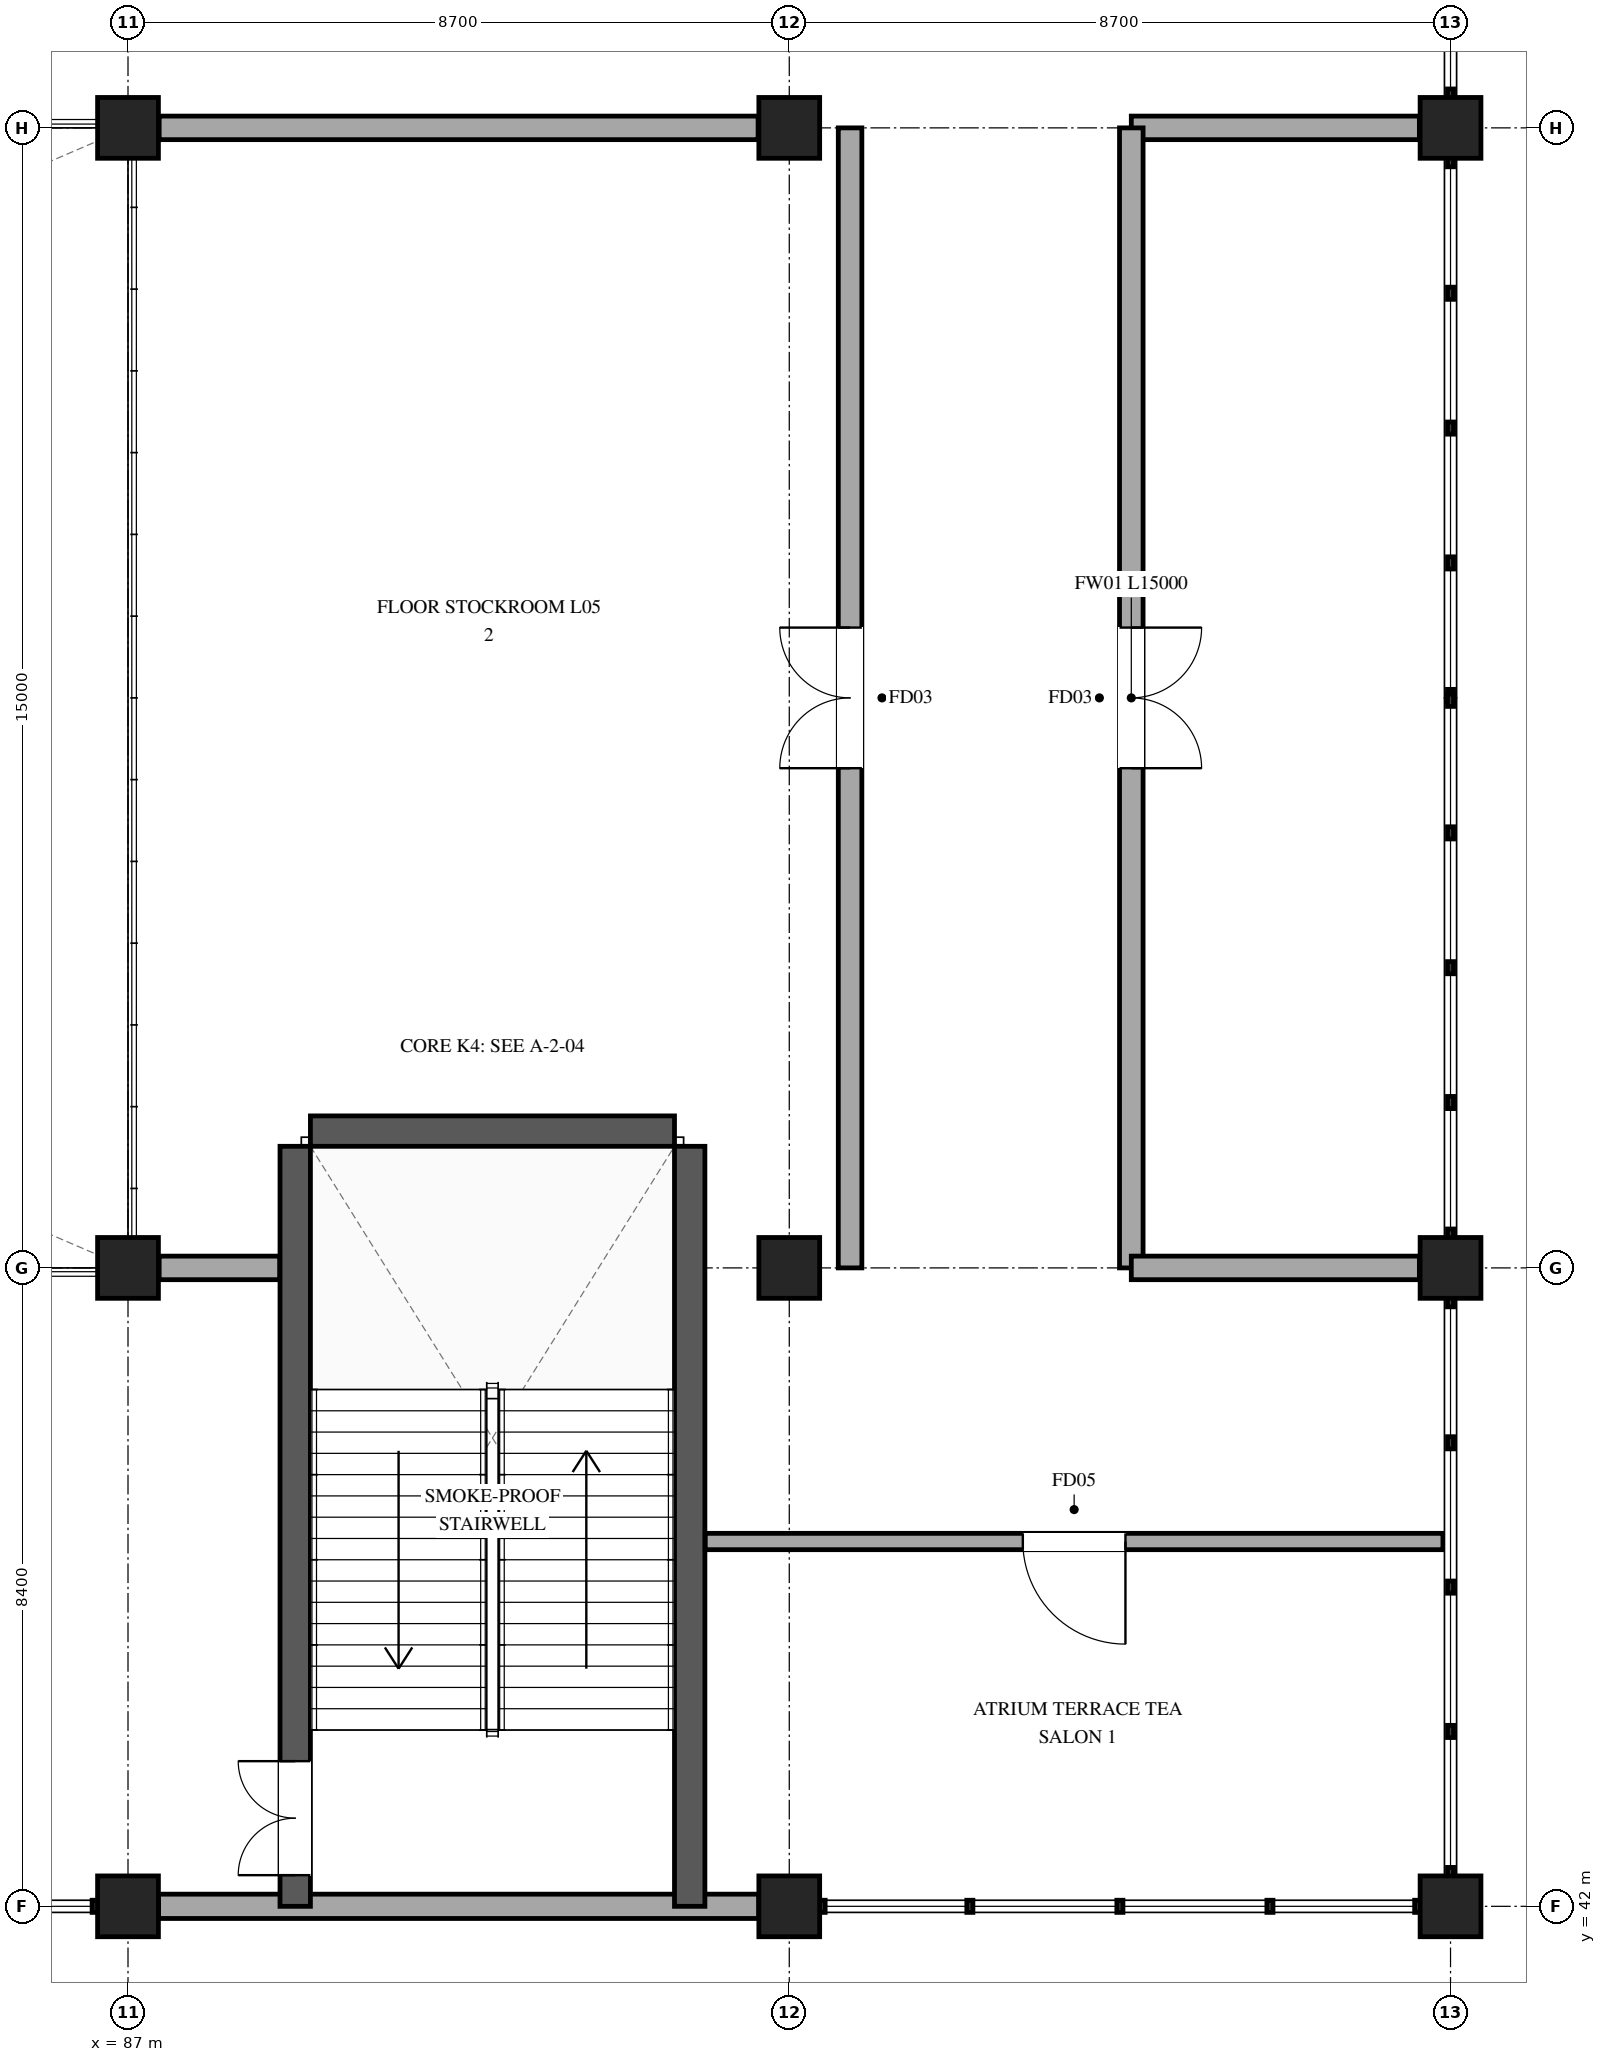
"""IFC4 building model, lengths in metres.
Left out: names, types, materials, properties, quantities, classifications, styles, units other than length and angle.
Written with IfcOpenShell. Run it as: python <this file> out.ifc"""

import sys

from ifc_helpers import new_model, si_unit, direction, frame, frame_2d, origin, origin_2d, place, context, subcontext, project, spatial, rectangle, extrude, element, fill, save


model = new_model("IFC4")
c1 = context("Model", 3, precision=1e-05, world=origin(), true_north=direction((0.0, 1.0)))
c2 = subcontext(c1, "Body", "Model", "MODEL_VIEW")
j1 = project(units=[si_unit("LENGTHUNIT", "METRE"), si_unit("PLANEANGLEUNIT", "RADIAN")], contexts=[c1])
p1 = place(None, origin())
s1 = spatial("IfcSite", under=j1, at=p1, CompositionType="ELEMENT")
p2 = place(p1, origin())
s2 = spatial("IfcBuilding", under=s1, at=p2, CompositionType="ELEMENT")
p3 = place(p2, frame((0.0, 0.0, 21.6)))
s3 = spatial("IfcBuildingStorey", under=s2, at=p3, CompositionType="ELEMENT", Elevation=21.6)
for number, where, z_axis, x_axis in (
    (1, (87.0, 42.0, 0.0), (0.0, 0.0, 1.0), (1.0, 0.0, 0.0)),
    (2, (87.0, 50.4, 0.0), (0.0, 0.0, 1.0), (1.0, 0.0, 0.0)),
    (3, (87.0, 65.4, 0.0), (0.0, 0.0, 1.0), (1.0, 0.0, 0.0)),
    (4, (95.7, 42.0, 0.0), (0.0, 0.0, 1.0), (1.0, 0.0, 0.0)),
    (5, (95.7, 50.4, 0.0), (0.0, 0.0, 1.0), (1.0, 0.0, 0.0)),
    (6, (95.7, 65.4, 0.0), (0.0, 0.0, 1.0), (1.0, 0.0, 0.0)),
    (7, (104.4, 42.0, 0.0), (0.0, 0.0, 1.0), (1.0, 0.0, 0.0)),
    (8, (104.4, 50.4, 0.0), (0.0, 0.0, 1.0), (1.0, 0.0, 0.0)),
    (9, (104.4, 65.4, 0.0), (0.0, 0.0, 1.0), (1.0, 0.0, 0.0)),
):
    element("IfcColumn", number, at=place(p3, frame(where, z_axis=z_axis, x_axis=x_axis)), inside=s3, PredefinedType="COLUMN", context=c2, shape_type="SweptSolid", body=[
        extrude(rectangle(XDim=0.8, YDim=0.8, at=origin_2d()), origin(), (0.0, 0.0, 1.0), 5.1),
    ])
p4 = place(p3, frame((95.298, 42.0, 0.0), z_axis=(0.0, 0.0, 1.0), x_axis=(-1.0, 0.0, 0.0)))
e10 = element("IfcWall", 10, at=p4, inside=s3, PredefinedType="STANDARD", context=c2, shape_type="SweptSolid", body=[
    extrude(rectangle(XDim=7.896, YDim=0.32, at=frame_2d((3.948, 0.0))), origin(), (0.0, 0.0, 1.0), 4.79),
])
p5 = place(p3, frame((89.2, 42.0, 0.0), z_axis=(0.0, 0.0, 1.0), x_axis=(0.0, 1.0, 0.0)))
e11 = element("IfcWall", 11, at=p5, inside=s3, PredefinedType="SHEAR", context=c2, shape_type="SweptSolid", body=[
    extrude(rectangle(XDim=10.0, YDim=0.4, at=frame_2d((5.0, 0.0))), origin(), (0.0, 0.0, 1.0), 5.1),
])
p6 = place(p5, frame((0.41, 0.0, 0.0)))
e12 = element("IfcOpeningElement", 12, at=p6, cuts=e11, PredefinedType="OPENING", context=c2, shape_type="SweptSolid", body=[
    extrude(rectangle(XDim=1.5, YDim=2.2, at=frame_2d((0.75, 1.1))), frame((0.0, 0.21, 0.0), z_axis=(0.0, -1.0, 0.0), x_axis=(1.0, 0.0, 0.0)), (0.0, 0.0, 1.0), 0.42),
])
p7 = place(p3, frame((94.39, 52.0, 0.0), z_axis=(0.0, 0.0, 1.0), x_axis=(0.0, -1.0, 0.0)))
e13 = element("IfcWall", 13, at=p7, inside=s3, PredefinedType="SHEAR", context=c2, shape_type="SweptSolid", body=[
    extrude(rectangle(XDim=10.0, YDim=0.4, at=frame_2d((5.0, 0.0))), origin(), (0.0, 0.0, 1.0), 5.1),
])
p8 = place(p3, frame((89.4, 52.2, 0.0), z_axis=(0.0, 0.0, 1.0), x_axis=(1.0, 0.0, 0.0)))
e14 = element("IfcWall", 14, at=p8, inside=s3, PredefinedType="SHEAR", context=c2, shape_type="SweptSolid", body=[
    extrude(rectangle(XDim=4.79, YDim=0.4, at=frame_2d((2.395, 0.0))), origin(), (0.0, 0.0, 1.0), 5.1),
])
p9 = place(p3, frame((104.3, 46.8, 0.0), z_axis=(0.0, 0.0, 1.0), x_axis=(-1.0, 0.0, 0.0)))
e15 = element("IfcWall", 15, at=p9, inside=s3, PredefinedType="PARTITIONING", context=c2, shape_type="SweptSolid", body=[
    extrude(rectangle(XDim=9.705, YDim=0.215, at=frame_2d((4.853, 0.0))), origin(), (0.0, 0.0, 1.0), 4.06),
])
p10 = place(p9, frame((4.177, 0.0, 0.0)))
e16 = element("IfcOpeningElement", 16, at=p10, cuts=e15, PredefinedType="OPENING", context=c2, shape_type="SweptSolid", body=[
    extrude(rectangle(XDim=1.35, YDim=2.2, at=frame_2d((0.675, 1.1))), frame((0.0, 0.118, 0.0), z_axis=(0.0, -1.0, 0.0), x_axis=(1.0, 0.0, 0.0)), (0.0, 0.0, 1.0), 0.235),
])
p11 = place(p3, frame((103.99, 65.4, 0.0), z_axis=(0.0, 0.0, 1.0), x_axis=(-1.0, 0.0, 0.0)))
e17 = element("IfcWall", 17, at=p11, inside=s3, PredefinedType="STANDARD", context=c2, shape_type="SweptSolid", body=[
    extrude(rectangle(XDim=3.79, YDim=0.31, at=frame_2d((1.895, 0.0))), origin(), (0.0, 0.0, 1.0), 4.06),
])
p12 = place(p3, frame((100.2, 65.4, 0.0), z_axis=(0.0, 0.0, 1.0), x_axis=(0.0, -1.0, 0.0)))
e18 = element("IfcWall", 18, at=p12, inside=s3, PredefinedType="STANDARD", context=c2, shape_type="SweptSolid", body=[
    extrude(rectangle(XDim=15.0, YDim=0.31, at=frame_2d((7.5, 0.0))), origin(), (0.0, 0.0, 1.0), 4.06),
])
p13 = place(p12, frame((6.575, 0.0, 0.0)))
e19 = element("IfcOpeningElement", 19, at=p13, cuts=e18, PredefinedType="OPENING", context=c2, shape_type="SweptSolid", body=[
    extrude(rectangle(XDim=1.85, YDim=2.3, at=frame_2d((0.925, 1.15))), frame((0.0, 0.165, 0.0), z_axis=(0.0, -1.0, 0.0), x_axis=(1.0, 0.0, 0.0)), (0.0, 0.0, 1.0), 0.33),
])
p14 = place(p3, frame((100.2, 50.4, 0.0), z_axis=(0.0, 0.0, 1.0), x_axis=(1.0, 0.0, 0.0)))
e20 = element("IfcWall", 20, at=p14, inside=s3, PredefinedType="STANDARD", context=c2, shape_type="SweptSolid", body=[
    extrude(rectangle(XDim=3.79, YDim=0.31, at=frame_2d((1.895, 0.0))), origin(), (0.0, 0.0, 1.0), 4.06),
])
p15 = place(p3, frame((87.41, 50.4, 0.0), z_axis=(0.0, 0.0, 1.0), x_axis=(1.0, 0.0, 0.0)))
e21 = element("IfcWall", 21, at=p15, inside=s3, PredefinedType="STANDARD", context=c2, shape_type="SweptSolid", body=[
    extrude(rectangle(XDim=1.585, YDim=0.31, at=frame_2d((0.792, 0.0))), origin(), (0.0, 0.0, 1.0), 4.76),
])
p16 = place(p3, frame((96.5, 50.4, 0.0), z_axis=(0.0, 0.0, 1.0), x_axis=(0.0, 1.0, 0.0)))
e22 = element("IfcWall", 22, at=p16, inside=s3, PredefinedType="STANDARD", context=c2, shape_type="SweptSolid", body=[
    extrude(rectangle(XDim=15.0, YDim=0.31, at=frame_2d((7.5, 0.0))), origin(), (0.0, 0.0, 1.0), 4.06),
])
p17 = place(p16, frame((6.575, 0.0, 0.0)))
e23 = element("IfcOpeningElement", 23, at=p17, cuts=e22, PredefinedType="OPENING", context=c2, shape_type="SweptSolid", body=[
    extrude(rectangle(XDim=1.85, YDim=2.3, at=frame_2d((0.925, 1.15))), frame((0.0, 0.165, 0.0), z_axis=(0.0, -1.0, 0.0), x_axis=(1.0, 0.0, 0.0)), (0.0, 0.0, 1.0), 0.33),
])
p18 = place(p3, frame((95.29, 65.4, 0.0), z_axis=(0.0, 0.0, 1.0), x_axis=(-1.0, 0.0, 0.0)))
e24 = element("IfcWall", 24, at=p18, inside=s3, PredefinedType="STANDARD", context=c2, shape_type="SweptSolid", body=[
    extrude(rectangle(XDim=7.88, YDim=0.31, at=frame_2d((3.94, 0.0))), origin(), (0.0, 0.0, 1.0), 4.06),
])
p19 = place(p6, origin())
e25 = element("IfcDoor", 25, at=p19, inside=s3, OperationType="DOUBLE_DOOR_SINGLE_SWING", PredefinedType="DOOR", context=c2, shape_type="SweptSolid", body=[
    extrude(rectangle(XDim=1.5, YDim=2.2, at=frame_2d((0.75, 1.1))), frame((0.0, 0.025, 0.0), z_axis=(0.0, -1.0, 0.0), x_axis=(1.0, 0.0, 0.0)), (0.0, 0.0, 1.0), 0.05),
])
fill(e12, e25)
p20 = place(p10, origin())
e26 = element("IfcDoor", 26, at=p20, inside=s3, OperationType="SINGLE_SWING_LEFT", PredefinedType="DOOR", context=c2, shape_type="SweptSolid", body=[
    extrude(rectangle(XDim=1.35, YDim=2.2, at=frame_2d((0.675, 1.1))), frame((0.0, 0.025, 0.0), z_axis=(0.0, -1.0, 0.0), x_axis=(1.0, 0.0, 0.0)), (0.0, 0.0, 1.0), 0.05),
])
fill(e16, e26)
p21 = place(p13, origin())
e27 = element("IfcDoor", 27, at=p21, inside=s3, OperationType="DOUBLE_DOOR_SINGLE_SWING", PredefinedType="DOOR", context=c2, shape_type="SweptSolid", body=[
    extrude(rectangle(XDim=1.85, YDim=2.3, at=frame_2d((0.925, 1.15))), frame((0.0, 0.025, 0.0), z_axis=(0.0, -1.0, 0.0), x_axis=(1.0, 0.0, 0.0)), (0.0, 0.0, 1.0), 0.05),
])
fill(e19, e27)
p22 = place(p17, origin())
e28 = element("IfcDoor", 28, at=p22, inside=s3, OperationType="DOUBLE_DOOR_SINGLE_SWING", PredefinedType="DOOR", context=c2, shape_type="SweptSolid", body=[
    extrude(rectangle(XDim=1.85, YDim=2.3, at=frame_2d((0.925, 1.15))), frame((0.0, 0.025, 0.0), z_axis=(0.0, -1.0, 0.0), x_axis=(1.0, 0.0, 0.0)), (0.0, 0.0, 1.0), 0.05),
])
fill(e23, e28)
save(model, sys.argv[1])
